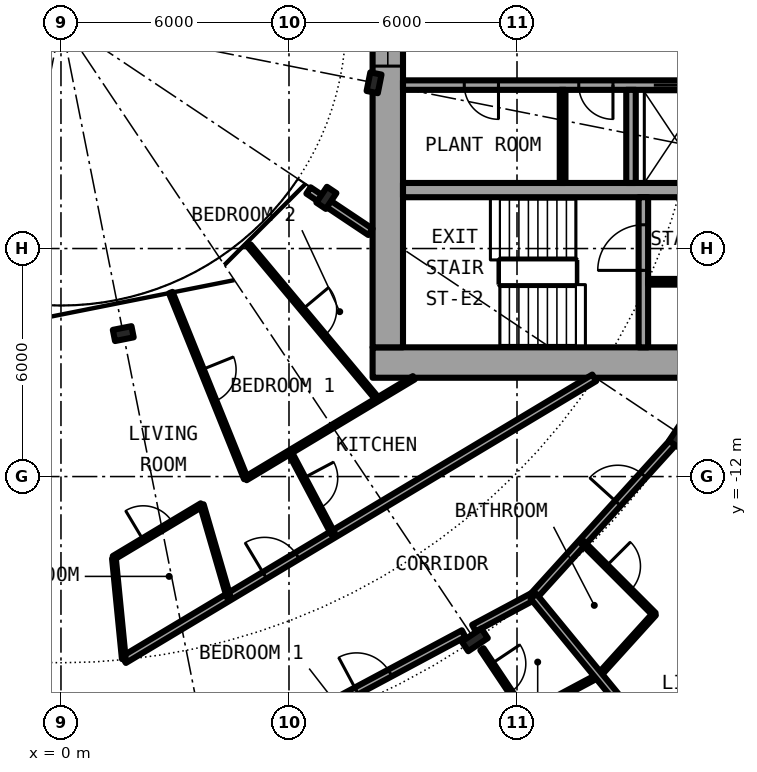
"""IFC4 building model, lengths in metres.
Left out: names, types, materials, properties, quantities, classifications, styles, units other than length and angle.
Written with IfcOpenShell. Run it as: python <this file> out.ifc"""

import sys

from ifc_helpers import new_model, si_unit, direction, frame, frame_2d, origin, origin_2d, place, context, subcontext, project, spatial, rectangle, i_section, extrude, element, fill, save


model = new_model("IFC4")
c1 = context("Model", 3, precision=1e-05, world=origin(), true_north=direction((0.0, 1.0)))
c2 = subcontext(c1, "Body", "Model", "MODEL_VIEW")
j1 = project(units=[si_unit("LENGTHUNIT", "METRE"), si_unit("PLANEANGLEUNIT", "RADIAN")], contexts=[c1])
p1 = place(None, origin())
s1 = spatial("IfcSite", under=j1, at=p1, CompositionType="ELEMENT")
p2 = place(p1, origin())
s2 = spatial("IfcBuilding", under=s1, at=p2, CompositionType="ELEMENT")
p3 = place(p2, frame((0.0, 0.0, 47.2)))
s3 = spatial("IfcBuildingStorey", under=s2, at=p3, CompositionType="ELEMENT", Elevation=47.2)
for number, where, z_axis, x_axis in (
    (1, (10.889, -16.297, 0.0), (0.0, 0.0, 1.0), (0.556, -0.831, 0.0)),
    (2, (16.297, -10.889, 0.0), (0.0, 0.0, 1.0), (0.831, -0.556, 0.0)),
):
    element("IfcColumn", number, at=place(p3, frame(where, z_axis=z_axis, x_axis=x_axis)), inside=s3, PredefinedType="COLUMN", context=c2, shape_type="SweptSolid", body=[
        extrude(i_section(OverallWidth=0.305, OverallDepth=0.62, WebThickness=0.021, FlangeThickness=0.04, FilletRadius=0.027, at=origin_2d()), origin(), (0.0, 0.0, 1.0), 3.05),
    ])
for number, where, z_axis, x_axis in (
    (3, (1.639, -8.239, 0.0), (0.0, 0.0, 1.0), (0.195, -0.981, 0.0)),
    (4, (6.984, -4.667, 0.0), (0.0, 0.0, 1.0), (0.831, -0.556, 0.0)),
    (5, (8.239, -1.639, 0.0), (0.0, 0.0, 1.0), (0.981, -0.195, 0.0)),
):
    element("IfcColumn", number, at=place(p3, frame(where, z_axis=z_axis, x_axis=x_axis)), inside=s3, PredefinedType="COLUMN", context=c2, shape_type="SweptSolid", body=[
        extrude(i_section(OverallWidth=0.3, OverallDepth=0.5, WebThickness=0.014, FlangeThickness=0.028, FilletRadius=0.027, at=origin_2d()), origin(), (0.0, 0.0, 1.0), 3.05),
    ])
p4 = place(p3, frame((8.2, -9.0, 0.0), z_axis=(0.0, 0.0, 1.0), x_axis=(1.0, 0.0, 0.0)))
e6 = element("IfcWall", 6, at=p4, inside=s3, PredefinedType="SHEAR", context=c2, shape_type="SweptSolid", body=[
    extrude(rectangle(XDim=14.2, YDim=0.8, at=frame_2d((7.1, 0.0))), origin(), (0.0, 0.0, 1.0), 3.05),
])
p5 = place(p4, frame((11.675, 0.0, 0.0)))
e7 = element("IfcOpeningElement", 7, at=p5, cuts=e6, PredefinedType="OPENING", context=c2, shape_type="SweptSolid", body=[
    extrude(rectangle(XDim=1.2, YDim=2.3, at=frame_2d((0.6, 1.15))), frame((0.0, 0.41, 0.0), z_axis=(0.0, -1.0, 0.0), x_axis=(1.0, 0.0, 0.0)), (0.0, 0.0, 1.0), 0.82),
])
p6 = place(p3, frame((8.6, -8.6, 0.0), z_axis=(0.0, 0.0, 1.0), x_axis=(0.0, 1.0, 0.0)))
e8 = element("IfcWall", 8, at=p6, inside=s3, PredefinedType="SHEAR", context=c2, shape_type="SweptSolid", body=[
    extrude(rectangle(XDim=17.2, YDim=0.8, at=frame_2d((8.6, 0.0))), origin(), (0.0, 0.0, 1.0), 3.05),
])
p7 = place(p6, frame((7.4, 0.0, 0.1)))
e9 = element("IfcOpeningElement", 9, at=p7, cuts=e8, PredefinedType="OPENING", context=c2, shape_type="SweptSolid", body=[
    extrude(rectangle(XDim=2.4, YDim=2.2, at=frame_2d((1.2, 1.1))), frame((0.0, 0.41, 0.0), z_axis=(0.0, -1.0, 0.0), x_axis=(1.0, 0.0, 0.0)), (0.0, 0.0, 1.0), 0.82),
])
p8 = place(p3, frame((19.15, -1.7, 0.0), z_axis=(0.0, 0.0, 1.0), x_axis=(-1.0, 0.0, 0.0)))
e10 = element("IfcWall", 10, at=p8, inside=s3, PredefinedType="SHEAR", context=c2, shape_type="SweptSolid", body=[
    extrude(rectangle(XDim=10.15, YDim=0.25, at=frame_2d((5.075, 0.0))), origin(), (0.0, 0.0, 1.0), 3.05),
])
p9 = place(p8, frame((2.45, 0.0, 0.0)))
e11 = element("IfcOpeningElement", 11, at=p9, cuts=e10, PredefinedType="OPENING", context=c2, shape_type="SweptSolid", body=[
    extrude(rectangle(XDim=1.1, YDim=2.3, at=frame_2d((0.55, 1.15))), frame((0.0, 0.135, 0.0), z_axis=(0.0, -1.0, 0.0), x_axis=(1.0, 0.0, 0.0)), (0.0, 0.0, 1.0), 0.27),
])
p10 = place(p8, frame((7.637, 0.0, 0.0)))
e12 = element("IfcOpeningElement", 12, at=p10, cuts=e10, PredefinedType="OPENING", context=c2, shape_type="SweptSolid", body=[
    extrude(rectangle(XDim=0.9, YDim=2.3, at=frame_2d((0.45, 1.15))), frame((0.0, 0.135, 0.0), z_axis=(0.0, -1.0, 0.0), x_axis=(1.0, 0.0, 0.0)), (0.0, 0.0, 1.0), 0.27),
])
p11 = place(p8, frame((4.625, 0.0, 0.0)))
e13 = element("IfcOpeningElement", 13, at=p11, cuts=e10, PredefinedType="OPENING", context=c2, shape_type="SweptSolid", body=[
    extrude(rectangle(XDim=0.9, YDim=2.3, at=frame_2d((0.45, 1.15))), frame((0.0, 0.135, 0.0), z_axis=(0.0, -1.0, 0.0), x_axis=(1.0, 0.0, 0.0)), (0.0, 0.0, 1.0), 0.27),
])
p12 = place(p8, frame((0.413, 0.0, 0.0)))
e14 = element("IfcOpeningElement", 14, at=p12, cuts=e10, PredefinedType="OPENING", context=c2, shape_type="SweptSolid", body=[
    extrude(rectangle(XDim=0.9, YDim=2.3, at=frame_2d((0.45, 1.15))), frame((0.0, 0.135, 0.0), z_axis=(0.0, -1.0, 0.0), x_axis=(1.0, 0.0, 0.0)), (0.0, 0.0, 1.0), 0.27),
])
p13 = place(p3, frame((9.0, -4.462, 0.0), z_axis=(0.0, 0.0, 1.0), x_axis=(1.0, 0.0, 0.0)))
e15 = element("IfcWall", 15, at=p13, inside=s3, PredefinedType="SHEAR", context=c2, shape_type="SweptSolid", body=[
    extrude(rectangle(XDim=10.15, YDim=0.375, at=frame_2d((5.075, 0.0))), origin(), (0.0, 0.0, 1.0), 3.05),
])
p14 = place(p3, frame((15.325, -8.6, 0.0), z_axis=(0.0, 0.0, 1.0), x_axis=(0.0, 1.0, 0.0)))
e16 = element("IfcWall", 16, at=p14, inside=s3, PredefinedType="SHEAR", context=c2, shape_type="SweptSolid", body=[
    extrude(rectangle(XDim=3.95, YDim=0.25, at=frame_2d((1.975, 0.0))), origin(), (0.0, 0.0, 1.0), 3.05),
])
p15 = place(p14, frame((2.025, 0.0, 0.0)))
e17 = element("IfcOpeningElement", 17, at=p15, cuts=e16, PredefinedType="OPENING", context=c2, shape_type="SweptSolid", body=[
    extrude(rectangle(XDim=1.2, YDim=2.3, at=frame_2d((0.6, 1.15))), frame((0.0, 0.135, 0.0), z_axis=(0.0, -1.0, 0.0), x_axis=(1.0, 0.0, 0.0)), (0.0, 0.0, 1.0), 0.27),
])
p16 = place(p3, frame((15.0, -1.825, 0.0), z_axis=(0.0, 0.0, 1.0), x_axis=(0.0, -1.0, 0.0)))
e18 = element("IfcWall", 18, at=p16, inside=s3, PredefinedType="SOLIDWALL", context=c2, shape_type="SweptSolid", body=[
    extrude(rectangle(XDim=2.45, YDim=0.25, at=frame_2d((1.225, 0.0))), origin(), (0.0, 0.0, 1.0), 2.7),
])
p17 = place(p3, frame((13.2, -1.825, 0.0), z_axis=(0.0, 0.0, 1.0), x_axis=(0.0, -1.0, 0.0)))
e19 = element("IfcWall", 19, at=p17, inside=s3, PredefinedType="PARTITIONING", context=c2, shape_type="SweptSolid", body=[
    extrude(rectangle(XDim=2.45, YDim=0.15, at=frame_2d((1.225, 0.0))), origin(), (0.0, 0.0, 1.0), 2.7),
])
p18 = place(p3, frame((15.45, -6.875, 0.0), z_axis=(0.0, 0.0, 1.0), x_axis=(1.0, 0.0, 0.0)))
e20 = element("IfcWall", 20, at=p18, inside=s3, PredefinedType="PARTITIONING", context=c2, shape_type="SweptSolid", body=[
    extrude(rectangle(XDim=3.7, YDim=0.15, at=frame_2d((1.85, 0.0))), origin(), (0.0, 0.0, 1.0), 2.7),
])
p19 = place(p18, frame((1.4, 0.0, 0.0)))
e21 = element("IfcOpeningElement", 21, at=p19, cuts=e20, PredefinedType="OPENING", context=c2, shape_type="SweptSolid", body=[
    extrude(rectangle(XDim=0.9, YDim=2.3, at=frame_2d((0.45, 1.15))), frame((0.0, 0.085, 0.0), z_axis=(0.0, -1.0, 0.0), x_axis=(1.0, 0.0, 0.0)), (0.0, 0.0, 1.0), 0.17),
])
p20 = place(p3, frame((14.153, -17.234, 0.0), z_axis=(0.0, 0.0, 1.0), x_axis=(0.671144831591, 0.741326254107, 0.0)))
e22 = element("IfcWall", 22, at=p20, inside=s3, PredefinedType="PARTITIONING", context=c2, shape_type="SweptSolid", body=[
    extrude(rectangle(XDim=2.181, YDim=0.1, at=frame_2d((1.091, 0.0))), origin(), (0.0, 0.0, 1.0), 2.7),
])
p21 = place(p3, frame((12.229, -18.264, 0.0), z_axis=(0.0, 0.0, 1.0), x_axis=(0.881786813167, 0.471648191055, 0.0)))
e23 = element("IfcWall", 23, at=p21, inside=s3, PredefinedType="PARTITIONING", context=c2, shape_type="SweptSolid", body=[
    extrude(rectangle(XDim=2.175, YDim=0.1, at=frame_2d((1.087, 0.0))), origin(), (0.0, 0.0, 1.0), 2.7),
])
p22 = place(p3, frame((12.434, -15.151, 0.0), z_axis=(0.0, 0.0, 1.0), x_axis=(0.671514934772, 0.740991020444, 0.0)))
e24 = element("IfcWall", 24, at=p22, inside=s3, PredefinedType="PARTITIONING", context=c2, shape_type="SweptSolid", body=[
    extrude(rectangle(XDim=5.598, YDim=0.2, at=frame_2d((2.799, 0.0))), origin(), (0.0, 0.0, 1.0), 2.38),
])
p23 = place(p22, frame((3.305, 0.0, 0.0)))
e25 = element("IfcOpeningElement", 25, at=p23, cuts=e24, PredefinedType="OPENING", context=c2, shape_type="SweptSolid", body=[
    extrude(rectangle(XDim=1.0, YDim=2.3, at=frame_2d((0.5, 1.15))), frame((0.0, 0.11, 0.0), z_axis=(0.0, -1.0, 0.0), x_axis=(1.0, 0.0, 0.0)), (0.0, 0.0, 1.0), 0.22),
])
p24 = place(p3, frame((5.69, -18.756, 0.0), z_axis=(0.0, 0.0, 1.0), x_axis=(0.881866548297, 0.471499089072, 0.0)))
e26 = element("IfcWall", 26, at=p24, inside=s3, PredefinedType="PARTITIONING", context=c2, shape_type="SweptSolid", body=[
    extrude(rectangle(XDim=5.563, YDim=0.2, at=frame_2d((2.782, 0.0))), origin(), (0.0, 0.0, 1.0), 2.38),
])
p25 = place(p24, frame((2.368, 0.0, 0.0)))
e27 = element("IfcOpeningElement", 27, at=p25, cuts=e26, PredefinedType="OPENING", context=c2, shape_type="SweptSolid", body=[
    extrude(rectangle(XDim=1.0, YDim=2.3, at=frame_2d((0.5, 1.15))), frame((0.0, 0.11, 0.0), z_axis=(0.0, -1.0, 0.0), x_axis=(1.0, 0.0, 0.0)), (0.0, 0.0, 1.0), 0.22),
])
p26 = place(p3, frame((10.867, -15.989, 0.0), z_axis=(0.0, 0.0, 1.0), x_axis=(0.881596178172, 0.472004426496, 0.0)))
e28 = element("IfcWall", 28, at=p26, inside=s3, PredefinedType="PARTITIONING", context=c2, shape_type="SweptSolid", body=[
    extrude(rectangle(XDim=1.78, YDim=0.2, at=frame_2d((0.89, 0.0))), origin(), (0.0, 0.0, 1.0), 2.38),
])
p27 = place(p3, frame((1.656, -16.819, 0.0), z_axis=(0.0, 0.0, 1.0), x_axis=(0.857773470126, 0.514027892189, 0.0)))
e29 = element("IfcWall", 29, at=p27, inside=s3, PredefinedType="PARTITIONING", context=c2, shape_type="SweptSolid", body=[
    extrude(rectangle(XDim=14.429, YDim=0.2, at=frame_2d((7.215, 0.0))), origin(), (0.0, 0.0, 1.0), 2.7),
])
p28 = place(p27, frame((4.318, 0.0, 0.0)))
e30 = element("IfcOpeningElement", 30, at=p28, cuts=e29, PredefinedType="OPENING", context=c2, shape_type="SweptSolid", body=[
    extrude(rectangle(XDim=1.0, YDim=2.3, at=frame_2d((0.5, 1.15))), frame((0.0, 0.11, 0.0), z_axis=(0.0, -1.0, 0.0), x_axis=(1.0, 0.0, 0.0)), (0.0, 0.0, 1.0), 0.22),
])
p29 = place(p3, frame((1.388, -14.134, 0.0), z_axis=(0.0, 0.0, 1.0), x_axis=(0.857820034452, 0.513950180945, 0.0)))
e31 = element("IfcWall", 31, at=p29, inside=s3, PredefinedType="PARTITIONING", context=c2, shape_type="SweptSolid", body=[
    extrude(rectangle(XDim=2.699, YDim=0.1, at=frame_2d((1.349, 0.0))), origin(), (0.0, 0.0, 1.0), 2.7),
])
p30 = place(p29, frame((0.904, 0.0, 0.0)))
e32 = element("IfcOpeningElement", 32, at=p30, cuts=e31, PredefinedType="OPENING", context=c2, shape_type="SweptSolid", body=[
    extrude(rectangle(XDim=0.9, YDim=2.3, at=frame_2d((0.45, 1.15))), frame((0.0, 0.06, 0.0), z_axis=(0.0, -1.0, 0.0), x_axis=(1.0, 0.0, 0.0)), (0.0, 0.0, 1.0), 0.12),
])
p31 = place(p3, frame((4.86, -12.053, 0.0), z_axis=(0.0, 0.0, 1.0), x_axis=(0.857697418837, 0.514154779926, 0.0)))
e33 = element("IfcWall", 33, at=p31, inside=s3, PredefinedType="PARTITIONING", context=c2, shape_type="SweptSolid", body=[
    extrude(rectangle(XDim=5.16, YDim=0.1, at=frame_2d((2.58, 0.0))), origin(), (0.0, 0.0, 1.0), 2.7),
])
p32 = place(p3, frame((6.513, -4.472, 0.0), z_axis=(0.0, 0.0, 1.0), x_axis=(0.831417956244, -0.555647533996, 0.0)))
e34 = element("IfcWall", 34, at=p32, inside=s3, PredefinedType="PARTITIONING", context=c2, shape_type="SweptSolid", body=[
    extrude(rectangle(XDim=1.962, YDim=0.2, at=frame_2d((0.981, 0.0))), origin(), (0.0, 0.0, 1.0), 2.7),
])
p33 = place(p3, frame((2.889, -7.159, 0.0), z_axis=(0.0, 0.0, 1.0), x_axis=(0.374372761824, -0.927278294367, 0.0)))
e35 = element("IfcWall", 35, at=p33, inside=s3, PredefinedType="PARTITIONING", context=c2, shape_type="SweptSolid", body=[
    extrude(rectangle(XDim=5.276, YDim=0.1, at=frame_2d((2.638, 0.0))), origin(), (0.0, 0.0, 1.0), 2.7),
])
p34 = place(p33, frame((2.188, 0.0, 0.0)))
e36 = element("IfcOpeningElement", 36, at=p34, cuts=e35, PredefinedType="OPENING", context=c2, shape_type="SweptSolid", body=[
    extrude(rectangle(XDim=0.9, YDim=2.3, at=frame_2d((0.45, 1.15))), frame((0.0, 0.06, 0.0), z_axis=(0.0, -1.0, 0.0), x_axis=(1.0, 0.0, 0.0)), (0.0, 0.0, 1.0), 0.12),
])
p35 = place(p3, frame((3.706, -12.744, 0.0), z_axis=(0.0, 0.0, 1.0), x_axis=(0.279201466266, -0.960232545395, 0.0)))
e37 = element("IfcWall", 37, at=p35, inside=s3, PredefinedType="PARTITIONING", context=c2, shape_type="SweptSolid", body=[
    extrude(rectangle(XDim=2.524, YDim=0.1, at=frame_2d((1.262, 0.0))), origin(), (0.0, 0.0, 1.0), 2.7),
])
p36 = place(p3, frame((4.952, -5.923, 0.0), z_axis=(0.0, 0.0, 1.0), x_axis=(0.641376424834, -0.767226356213, 0.0)))
e38 = element("IfcWall", 38, at=p36, inside=s3, PredefinedType="PARTITIONING", context=c2, shape_type="SweptSolid", body=[
    extrude(rectangle(XDim=5.275, YDim=0.1, at=frame_2d((2.637, 0.0))), origin(), (0.0, 0.0, 1.0), 2.7),
])
p37 = place(p36, frame((2.187, 0.0, 0.0)))
e39 = element("IfcOpeningElement", 39, at=p37, cuts=e38, PredefinedType="OPENING", context=c2, shape_type="SweptSolid", body=[
    extrude(rectangle(XDim=0.9, YDim=2.3, at=frame_2d((0.45, 1.15))), frame((0.0, 0.06, 0.0), z_axis=(0.0, -1.0, 0.0), x_axis=(1.0, 0.0, 0.0)), (0.0, 0.0, 1.0), 0.12),
])
p38 = place(p3, frame((6.021, -11.357, 0.0), z_axis=(0.0, 0.0, 1.0), x_axis=(0.468337293896, -0.883549760425, 0.0)))
e40 = element("IfcWall", 40, at=p38, inside=s3, PredefinedType="PARTITIONING", context=c2, shape_type="SweptSolid", body=[
    extrude(rectangle(XDim=2.445, YDim=0.1, at=frame_2d((1.222, 0.0))), origin(), (0.0, 0.0, 1.0), 2.7),
])
p39 = place(p38, frame((0.772, 0.0, 0.0)))
e41 = element("IfcOpeningElement", 41, at=p39, cuts=e40, PredefinedType="OPENING", context=c2, shape_type="SweptSolid", body=[
    extrude(rectangle(XDim=0.9, YDim=2.3, at=frame_2d((0.45, 1.15))), frame((0.0, 0.06, 0.0), z_axis=(0.0, -1.0, 0.0), x_axis=(1.0, 0.0, 0.0)), (0.0, 0.0, 1.0), 0.12),
])
p40 = place(p3, frame((11.077, -16.544, 0.0), z_axis=(0.0, 0.0, 1.0), x_axis=(0.556522278225, -0.830832687031, 0.0)))
e42 = element("IfcWall", 42, at=p40, inside=s3, PredefinedType="PARTITIONING", context=c2, shape_type="SweptSolid", body=[
    extrude(rectangle(XDim=2.07, YDim=0.1, at=frame_2d((1.035, 0.0))), origin(), (0.0, 0.0, 1.0), 2.7),
])
p41 = place(p40, frame((0.458, 0.0, 0.0)))
e43 = element("IfcOpeningElement", 43, at=p41, cuts=e42, PredefinedType="OPENING", context=c2, shape_type="SweptSolid", body=[
    extrude(rectangle(XDim=0.9, YDim=2.3, at=frame_2d((0.45, 1.15))), frame((0.0, 0.06, 0.0), z_axis=(0.0, -1.0, 0.0), x_axis=(1.0, 0.0, 0.0)), (0.0, 0.0, 1.0), 0.12),
])
p42 = place(p3, frame((12.434, -15.151, 0.0), z_axis=(0.0, 0.0, 1.0), x_axis=(0.634381303318, -0.773020285633, 0.0)))
e44 = element("IfcWall", 44, at=p42, inside=s3, PredefinedType="PARTITIONING", context=c2, shape_type="SweptSolid", body=[
    extrude(rectangle(XDim=7.576, YDim=0.2, at=frame_2d((3.788, 0.0))), origin(), (0.0, 0.0, 1.0), 2.7),
])
p43 = place(p3, frame((13.722, -13.73, 0.0), z_axis=(0.0, 0.0, 1.0), x_axis=(0.706741540154, -0.707471833659, 0.0)))
e45 = element("IfcWall", 45, at=p43, inside=s3, PredefinedType="PARTITIONING", context=c2, shape_type="SweptSolid", body=[
    extrude(rectangle(XDim=2.674, YDim=0.1, at=frame_2d((1.337, 0.0))), origin(), (0.0, 0.0, 1.0), 2.7),
])
p44 = place(p43, frame((0.887, 0.0, 0.0)))
e46 = element("IfcOpeningElement", 46, at=p44, cuts=e45, PredefinedType="OPENING", context=c2, shape_type="SweptSolid", body=[
    extrude(rectangle(XDim=0.9, YDim=2.3, at=frame_2d((0.45, 1.15))), frame((0.0, 0.06, 0.0), z_axis=(0.0, -1.0, 0.0), x_axis=(1.0, 0.0, 0.0)), (0.0, 0.0, 1.0), 0.12),
])
p45 = place(p3, frame((1.654, -16.797, 0.0), z_axis=(0.0, 0.0, 1.0), x_axis=(-0.097901702875, 0.995196089509, 0.0)))
e47 = element("IfcWall", 47, at=p45, inside=s3, PredefinedType="PARTITIONING", context=c2, shape_type="SweptSolid", body=[
    extrude(rectangle(XDim=2.656, YDim=0.1, at=frame_2d((1.328, 0.0))), origin(), (0.0, 0.0, 1.0), 2.7),
])
p46 = place(p9, origin())
e48 = element("IfcDoor", 48, at=p46, inside=s3, OperationType="DOUBLE_DOOR_SLIDING", PredefinedType="DOOR", context=c2, shape_type="SweptSolid", body=[
    extrude(rectangle(XDim=1.1, YDim=2.3, at=frame_2d((0.55, 1.15))), frame((0.0, 0.025, 0.0), z_axis=(0.0, -1.0, 0.0), x_axis=(1.0, 0.0, 0.0)), (0.0, 0.0, 1.0), 0.05),
])
fill(e11, e48)
p47 = place(p10, origin())
e49 = element("IfcDoor", 49, at=p47, inside=s3, OperationType="SINGLE_SWING_LEFT", PredefinedType="DOOR", context=c2, shape_type="SweptSolid", body=[
    extrude(rectangle(XDim=0.9, YDim=2.3, at=frame_2d((0.45, 1.15))), frame((0.0, 0.025, 0.0), z_axis=(0.0, -1.0, 0.0), x_axis=(1.0, 0.0, 0.0)), (0.0, 0.0, 1.0), 0.05),
])
fill(e12, e49)
p48 = place(p11, origin())
e50 = element("IfcDoor", 50, at=p48, inside=s3, OperationType="SINGLE_SWING_LEFT", PredefinedType="DOOR", context=c2, shape_type="SweptSolid", body=[
    extrude(rectangle(XDim=0.9, YDim=2.3, at=frame_2d((0.45, 1.15))), frame((0.0, 0.025, 0.0), z_axis=(0.0, -1.0, 0.0), x_axis=(1.0, 0.0, 0.0)), (0.0, 0.0, 1.0), 0.05),
])
fill(e13, e50)
p49 = place(p15, origin())
e51 = element("IfcDoor", 51, at=p49, inside=s3, OperationType="SINGLE_SWING_LEFT", PredefinedType="DOOR", context=c2, shape_type="SweptSolid", body=[
    extrude(rectangle(XDim=1.2, YDim=2.3, at=frame_2d((0.6, 1.15))), frame((0.0, 0.025, 0.0), z_axis=(0.0, -1.0, 0.0), x_axis=(1.0, 0.0, 0.0)), (0.0, 0.0, 1.0), 0.05),
])
fill(e17, e51)
p50 = place(p7, origin())
e52 = element("IfcWindow", 52, at=p50, inside=s3, PartitioningType="SINGLE_PANEL", PredefinedType="WINDOW", context=c2, shape_type="SweptSolid", body=[
    extrude(rectangle(XDim=2.4, YDim=2.2, at=frame_2d((1.2, 1.1))), frame((0.0, 0.03, 0.0), z_axis=(0.0, -1.0, 0.0), x_axis=(1.0, 0.0, 0.0)), (0.0, 0.0, 1.0), 0.06),
])
fill(e9, e52)
p51 = place(p25, origin())
e53 = element("IfcDoor", 53, at=p51, inside=s3, OperationType="SINGLE_SWING_RIGHT", PredefinedType="DOOR", context=c2, shape_type="SweptSolid", body=[
    extrude(rectangle(XDim=1.0, YDim=2.3, at=frame_2d((0.5, 1.15))), frame((0.0, 0.025, 0.0), z_axis=(0.0, -1.0, 0.0), x_axis=(1.0, 0.0, 0.0)), (0.0, 0.0, 1.0), 0.05),
])
fill(e27, e53)
p52 = place(p41, origin())
e54 = element("IfcDoor", 54, at=p52, inside=s3, OperationType="SINGLE_SWING_LEFT", PredefinedType="DOOR", context=c2, shape_type="SweptSolid", body=[
    extrude(rectangle(XDim=0.9, YDim=2.3, at=frame_2d((0.45, 1.15))), frame((0.0, 0.025, 0.0), z_axis=(0.0, -1.0, 0.0), x_axis=(1.0, 0.0, 0.0)), (0.0, 0.0, 1.0), 0.05),
])
fill(e43, e54)
p53 = place(p23, origin())
e55 = element("IfcDoor", 55, at=p53, inside=s3, OperationType="SINGLE_SWING_RIGHT", PredefinedType="DOOR", context=c2, shape_type="SweptSolid", body=[
    extrude(rectangle(XDim=1.0, YDim=2.3, at=frame_2d((0.5, 1.15))), frame((0.0, 0.025, 0.0), z_axis=(0.0, -1.0, 0.0), x_axis=(1.0, 0.0, 0.0)), (0.0, 0.0, 1.0), 0.05),
])
fill(e25, e55)
p54 = place(p44, origin())
e56 = element("IfcDoor", 56, at=p54, inside=s3, OperationType="SINGLE_SWING_RIGHT", PredefinedType="DOOR", context=c2, shape_type="SweptSolid", body=[
    extrude(rectangle(XDim=0.9, YDim=2.3, at=frame_2d((0.45, 1.15))), frame((0.0, 0.025, 0.0), z_axis=(0.0, -1.0, 0.0), x_axis=(1.0, 0.0, 0.0)), (0.0, 0.0, 1.0), 0.05),
])
fill(e46, e56)
p55 = place(p28, origin())
e57 = element("IfcDoor", 57, at=p55, inside=s3, OperationType="SINGLE_SWING_LEFT", PredefinedType="DOOR", context=c2, shape_type="SweptSolid", body=[
    extrude(rectangle(XDim=1.0, YDim=2.3, at=frame_2d((0.5, 1.15))), frame((0.0, 0.025, 0.0), z_axis=(0.0, -1.0, 0.0), x_axis=(1.0, 0.0, 0.0)), (0.0, 0.0, 1.0), 0.05),
])
fill(e30, e57)
p56 = place(p30, origin())
e58 = element("IfcDoor", 58, at=p56, inside=s3, OperationType="SINGLE_SWING_RIGHT", PredefinedType="DOOR", context=c2, shape_type="SweptSolid", body=[
    extrude(rectangle(XDim=0.9, YDim=2.3, at=frame_2d((0.45, 1.15))), frame((0.0, 0.025, 0.0), z_axis=(0.0, -1.0, 0.0), x_axis=(1.0, 0.0, 0.0)), (0.0, 0.0, 1.0), 0.05),
])
fill(e32, e58)
p57 = place(p39, origin())
e59 = element("IfcDoor", 59, at=p57, inside=s3, OperationType="SINGLE_SWING_RIGHT", PredefinedType="DOOR", context=c2, shape_type="SweptSolid", body=[
    extrude(rectangle(XDim=0.9, YDim=2.3, at=frame_2d((0.45, 1.15))), frame((0.0, 0.025, 0.0), z_axis=(0.0, -1.0, 0.0), x_axis=(1.0, 0.0, 0.0)), (0.0, 0.0, 1.0), 0.05),
])
fill(e41, e59)
p58 = place(p34, origin())
e60 = element("IfcDoor", 60, at=p58, inside=s3, OperationType="SINGLE_SWING_RIGHT", PredefinedType="DOOR", context=c2, shape_type="SweptSolid", body=[
    extrude(rectangle(XDim=0.9, YDim=2.3, at=frame_2d((0.45, 1.15))), frame((0.0, 0.025, 0.0), z_axis=(0.0, -1.0, 0.0), x_axis=(1.0, 0.0, 0.0)), (0.0, 0.0, 1.0), 0.05),
])
fill(e36, e60)
p59 = place(p37, origin())
e61 = element("IfcDoor", 61, at=p59, inside=s3, OperationType="SINGLE_SWING_RIGHT", PredefinedType="DOOR", context=c2, shape_type="SweptSolid", body=[
    extrude(rectangle(XDim=0.9, YDim=2.3, at=frame_2d((0.45, 1.15))), frame((0.0, 0.025, 0.0), z_axis=(0.0, -1.0, 0.0), x_axis=(1.0, 0.0, 0.0)), (0.0, 0.0, 1.0), 0.05),
])
fill(e39, e61)
save(model, sys.argv[1])
